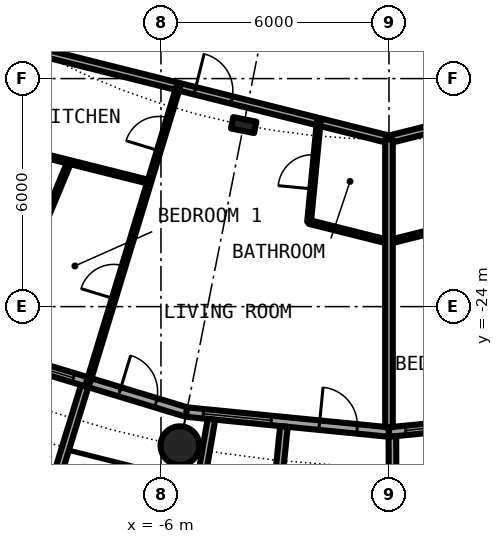
"""IFC4 building model, lengths in metres.
Left out: names, types, materials, properties, quantities, classifications, styles, units other than length and angle.
Written with IfcOpenShell. Run it as: python <this file> out.ifc"""

import sys

from ifc_helpers import new_model, si_unit, direction, frame, frame_2d, origin, origin_2d, place, context, subcontext, project, spatial, rectangle, circle, hollow_circle, i_section, extrude, element, fill, save


model = new_model("IFC4")
c1 = context("Model", 3, precision=1e-05, world=origin(), true_north=direction((0.0, 1.0)))
c2 = subcontext(c1, "Body", "Model", "MODEL_VIEW")
j1 = project(units=[si_unit("LENGTHUNIT", "METRE"), si_unit("PLANEANGLEUNIT", "RADIAN")], contexts=[c1])
p1 = place(None, origin())
s1 = spatial("IfcSite", under=j1, at=p1, CompositionType="ELEMENT")
p2 = place(p1, origin())
s2 = spatial("IfcBuilding", under=s1, at=p2, CompositionType="ELEMENT")
p3 = place(p2, frame((0.0, 0.0, 28.9)))
s3 = spatial("IfcBuildingStorey", under=s2, at=p3, CompositionType="ELEMENT", Elevation=28.9)
p4 = place(p3, frame((-5.501, -27.658, 0.0), z_axis=(0.0, 0.0, 1.0), x_axis=(1.0, 0.0, 0.0)))
e1 = element("IfcColumn", 1, at=p4, inside=s3, PredefinedType="COLUMN", context=c2, shape_type="SweptSolid", body=[
    extrude(hollow_circle(Radius=0.508, WallThickness=0.05, at=origin_2d()), origin(), (0.0, 0.0, 1.0), 3.05),
])
p5 = place(p3, frame((-3.824, -19.223, 0.0), z_axis=(0.0, 0.0, 1.0), x_axis=(-0.195090322016, -0.980785280403, 0.0)))
e2 = element("IfcColumn", 2, at=p5, inside=s3, PredefinedType="COLUMN", context=c2, shape_type="SweptSolid", body=[
    extrude(i_section(OverallWidth=0.305, OverallDepth=0.62, WebThickness=0.021, FlangeThickness=0.04, FilletRadius=0.027, at=origin_2d()), origin(), (0.0, 0.0, 1.0), 3.05),
])
p6 = place(p3, frame((-10.447, -25.222, 0.0), z_axis=(0.0, 0.0, 1.0), x_axis=(0.956965678721, -0.290201119486, 0.0)))
e3 = element("IfcWall", 3, at=p6, inside=s3, PredefinedType="SOLIDWALL", context=c2, shape_type="SweptSolid", body=[
    extrude(rectangle(XDim=5.351, YDim=0.25, at=frame_2d((2.676, 0.0))), origin(), (0.0, 0.0, 1.0), 2.7),
])
p7 = place(p6, frame((0.441, 0.0, 0.3)))
e4 = element("IfcOpeningElement", 4, at=p7, cuts=e3, PredefinedType="OPENING", context=c2, shape_type="SweptSolid", body=[
    extrude(rectangle(XDim=1.8, YDim=2.1, at=frame_2d((0.9, 1.05))), frame((0.0, 0.135, 0.0), z_axis=(0.0, -1.0, 0.0), x_axis=(1.0, 0.0, 0.0)), (0.0, 0.0, 1.0), 0.27),
])
p8 = place(p6, frame((3.51, 0.0, 0.0)))
e5 = element("IfcOpeningElement", 5, at=p8, cuts=e3, PredefinedType="OPENING", context=c2, shape_type="SweptSolid", body=[
    extrude(rectangle(XDim=1.0, YDim=2.2, at=frame_2d((0.5, 1.1))), frame((0.0, 0.135, 0.0), z_axis=(0.0, -1.0, 0.0), x_axis=(1.0, 0.0, 0.0)), (0.0, 0.0, 1.0), 0.27),
])
p9 = place(p3, frame((-11.638, -28.084, -0.03), z_axis=(0.0, 0.0, 1.0), x_axis=(0.941461077774, -0.337121697664, 0.0)))
e6 = element("IfcWall", 6, at=p9, inside=s3, PredefinedType="SOLIDWALL", context=c2, shape_type="SweptSolid", body=[
    extrude(rectangle(XDim=2.993, YDim=0.2, at=frame_2d((1.497, 0.0))), origin(), (0.0, 0.0, 1.0), 2.73),
])
p10 = place(p9, frame((0.457, 0.0, 0.33)))
e7 = element("IfcOpeningElement", 7, at=p10, cuts=e6, PredefinedType="OPENING", context=c2, shape_type="SweptSolid", body=[
    extrude(circle(Radius=1.04, at=frame_2d((1.04, 1.04))), frame((0.0, 0.11, 0.0), z_axis=(0.0, -1.0, 0.0), x_axis=(1.0, 0.0, 0.0)), (0.0, 0.0, 1.0), 0.22),
])
p11 = place(p3, frame((-8.009, -26.092, -0.03), z_axis=(0.0, 0.0, 1.0), x_axis=(-0.293406695073, -0.955987715029, 0.0)))
e8 = element("IfcWall", 8, at=p11, inside=s3, PredefinedType="SOLIDWALL", context=c2, shape_type="SweptSolid", body=[
    extrude(rectangle(XDim=3.006, YDim=0.2, at=frame_2d((1.503, 0.0))), origin(), (0.0, 0.0, 1.0), 2.73),
])
p12 = place(p3, frame((-5.326, -26.775, 0.0), z_axis=(0.0, 0.0, 1.0), x_axis=(0.995173996315, -0.098126026407, 0.0)))
e9 = element("IfcWall", 9, at=p12, inside=s3, PredefinedType="SOLIDWALL", context=c2, shape_type="SweptSolid", body=[
    extrude(rectangle(XDim=5.352, YDim=0.25, at=frame_2d((2.676, 0.0))), origin(), (0.0, 0.0, 1.0), 2.7),
])
p13 = place(p12, frame((0.441, 0.0, 0.3)))
e10 = element("IfcOpeningElement", 10, at=p13, cuts=e9, PredefinedType="OPENING", context=c2, shape_type="SweptSolid", body=[
    extrude(rectangle(XDim=1.8, YDim=2.1, at=frame_2d((0.9, 1.05))), frame((0.0, 0.135, 0.0), z_axis=(0.0, -1.0, 0.0), x_axis=(1.0, 0.0, 0.0)), (0.0, 0.0, 1.0), 0.27),
])
p14 = place(p12, frame((3.51, 0.0, 0.0)))
e11 = element("IfcOpeningElement", 11, at=p14, cuts=e9, PredefinedType="OPENING", context=c2, shape_type="SweptSolid", body=[
    extrude(rectangle(XDim=1.0, YDim=2.2, at=frame_2d((0.5, 1.1))), frame((0.0, 0.135, 0.0), z_axis=(0.0, -1.0, 0.0), x_axis=(1.0, 0.0, 0.0)), (0.0, 0.0, 1.0), 0.27),
])
p15 = place(p3, frame((-4.671, -26.966, -0.03), z_axis=(0.0, 0.0, 1.0), x_axis=(-0.170539878907, -0.985350774954, 0.0)))
e12 = element("IfcWall", 12, at=p15, inside=s3, PredefinedType="SOLIDWALL", context=c2, shape_type="SweptSolid", body=[
    extrude(rectangle(XDim=2.932, YDim=0.2, at=frame_2d((1.466, 0.0))), origin(), (0.0, 0.0, 1.0), 2.73),
])
p16 = place(p3, frame((-2.764, -27.153, -0.03), z_axis=(0.0, 0.0, 1.0), x_axis=(-0.101505487237, -0.994834979311, 0.0)))
e13 = element("IfcWall", 13, at=p16, inside=s3, PredefinedType="SOLIDWALL", context=c2, shape_type="SweptSolid", body=[
    extrude(rectangle(XDim=3.007, YDim=0.2, at=frame_2d((1.503, 0.0))), origin(), (0.0, 0.0, 1.0), 2.73),
])
p17 = place(p3, frame((0.0, -27.3, 0.0), z_axis=(0.0, 0.0, 1.0), x_axis=(0.995173996315, 0.098126026407, 0.0)))
e14 = element("IfcWall", 14, at=p17, inside=s3, PredefinedType="SOLIDWALL", context=c2, shape_type="SweptSolid", body=[
    extrude(rectangle(XDim=5.352, YDim=0.25, at=frame_2d((2.676, 0.0))), origin(), (0.0, 0.0, 1.0), 2.7),
])
p18 = place(p17, frame((0.441, 0.0, 0.3)))
e15 = element("IfcOpeningElement", 15, at=p18, cuts=e14, PredefinedType="OPENING", context=c2, shape_type="SweptSolid", body=[
    extrude(rectangle(XDim=1.8, YDim=2.1, at=frame_2d((0.9, 1.05))), frame((0.0, 0.135, 0.0), z_axis=(0.0, -1.0, 0.0), x_axis=(1.0, 0.0, 0.0)), (0.0, 0.0, 1.0), 0.27),
])
p19 = place(p17, frame((3.51, 0.0, 0.0)))
e16 = element("IfcOpeningElement", 16, at=p19, cuts=e14, PredefinedType="OPENING", context=c2, shape_type="SweptSolid", body=[
    extrude(rectangle(XDim=1.0, YDim=2.2, at=frame_2d((0.5, 1.1))), frame((0.0, 0.135, 0.0), z_axis=(0.0, -1.0, 0.0), x_axis=(1.0, 0.0, 0.0)), (0.0, 0.0, 1.0), 0.27),
])
p20 = place(p3, frame((0.09, -27.417, -0.03), z_axis=(0.0, 0.0, 1.0), x_axis=(0.00347308367, -0.999993968827, 0.0)))
e17 = element("IfcWall", 17, at=p20, inside=s3, PredefinedType="SOLIDWALL", context=c2, shape_type="SweptSolid", body=[
    extrude(rectangle(XDim=2.882, YDim=0.2, at=frame_2d((1.441, 0.0))), origin(), (0.0, 0.0, 1.0), 2.73),
])
p21 = place(p3, frame((-10.516, -19.666, 0.0), z_axis=(0.0, 0.0, 1.0), x_axis=(0.97005315629, -0.242892721118, 0.0)))
e18 = element("IfcWall", 18, at=p21, inside=s3, PredefinedType="PARTITIONING", context=c2, shape_type="SweptSolid", body=[
    extrude(rectangle(XDim=4.343, YDim=0.1, at=frame_2d((2.172, 0.0))), origin(), (0.0, 0.0, 1.0), 2.7),
])
p22 = place(p3, frame((-2.096, -21.774, 0.0), z_axis=(0.0, 0.0, 1.0), x_axis=(0.969969957613, -0.24322475476, 0.0)))
e19 = element("IfcWall", 19, at=p22, inside=s3, PredefinedType="PARTITIONING", context=c2, shape_type="SweptSolid", body=[
    extrude(rectangle(XDim=2.167, YDim=0.1, at=frame_2d((1.083, 0.0))), origin(), (0.0, 0.0, 1.0), 2.7),
])
p23 = place(p3, frame((-0.006, -22.301, 0.0), z_axis=(0.0, 0.0, 1.0), x_axis=(0.970106148391, 0.24268098577, 0.0)))
e20 = element("IfcWall", 20, at=p23, inside=s3, PredefinedType="PARTITIONING", context=c2, shape_type="SweptSolid", body=[
    extrude(rectangle(XDim=4.347, YDim=0.1, at=frame_2d((2.173, 0.0))), origin(), (0.0, 0.0, 1.0), 2.7),
])
p24 = place(p3, frame((-9.242, -17.284, 0.0), z_axis=(0.0, 0.0, 1.0), x_axis=(0.970002158938, -0.243096301198, 0.0)))
e21 = element("IfcWall", 21, at=p24, inside=s3, PredefinedType="PARTITIONING", context=c2, shape_type="SweptSolid", body=[
    extrude(rectangle(XDim=9.528, YDim=0.2, at=frame_2d((4.764, 0.0))), origin(), (0.0, 0.0, 1.0), 2.38),
])
p25 = place(p24, frame((4.262, 0.0, 0.0)))
e22 = element("IfcOpeningElement", 22, at=p25, cuts=e21, PredefinedType="OPENING", context=c2, shape_type="SweptSolid", body=[
    extrude(rectangle(XDim=1.0, YDim=2.3, at=frame_2d((0.5, 1.15))), frame((0.0, 0.11, 0.0), z_axis=(0.0, -1.0, 0.0), x_axis=(1.0, 0.0, 0.0)), (0.0, 0.0, 1.0), 0.22),
])
p26 = place(p3, frame((-0.001, -19.601, 0.0), z_axis=(0.0, 0.0, 1.0), x_axis=(0.970014215304, 0.243048188859, 0.0)))
e23 = element("IfcWall", 23, at=p26, inside=s3, PredefinedType="PARTITIONING", context=c2, shape_type="SweptSolid", body=[
    extrude(rectangle(XDim=9.526, YDim=0.2, at=frame_2d((4.763, 0.0))), origin(), (0.0, 0.0, 1.0), 2.38),
])
p27 = place(p26, frame((5.221, 0.0, 0.0)))
e24 = element("IfcOpeningElement", 24, at=p27, cuts=e23, PredefinedType="OPENING", context=c2, shape_type="SweptSolid", body=[
    extrude(rectangle(XDim=1.0, YDim=2.3, at=frame_2d((0.5, 1.15))), frame((0.0, 0.11, 0.0), z_axis=(0.0, -1.0, 0.0), x_axis=(1.0, 0.0, 0.0)), (0.0, 0.0, 1.0), 0.22),
])
p28 = place(p3, frame((-10.447, -25.086, 0.0), z_axis=(0.0, 0.0, 1.0), x_axis=(0.384363513821, 0.923181828917, 0.0)))
e25 = element("IfcWall", 25, at=p28, inside=s3, PredefinedType="PARTITIONING", context=c2, shape_type="SweptSolid", body=[
    extrude(rectangle(XDim=5.3, YDim=0.1, at=frame_2d((2.65, 0.0))), origin(), (0.0, 0.0, 1.0), 2.7),
])
p29 = place(p28, frame((2.2, 0.0, 0.0)))
e26 = element("IfcOpeningElement", 26, at=p29, cuts=e25, PredefinedType="OPENING", context=c2, shape_type="SweptSolid", body=[
    extrude(rectangle(XDim=0.9, YDim=2.3, at=frame_2d((0.45, 1.15))), frame((0.0, 0.06, 0.0), z_axis=(0.0, -1.0, 0.0), x_axis=(1.0, 0.0, 0.0)), (0.0, 0.0, 1.0), 0.12),
])
p30 = place(p3, frame((-7.914, -25.997, 0.0), z_axis=(0.0, 0.0, 1.0), x_axis=(0.291319167605, 0.956625915698, 0.0)))
e27 = element("IfcWall", 27, at=p30, inside=s3, PredefinedType="PARTITIONING", context=c2, shape_type="SweptSolid", body=[
    extrude(rectangle(XDim=8.139, YDim=0.1, at=frame_2d((4.07, 0.0))), origin(), (0.0, 0.0, 1.0), 2.7),
])
p31 = place(p30, frame((6.377, 0.0, 0.0)))
e28 = element("IfcOpeningElement", 28, at=p31, cuts=e27, PredefinedType="OPENING", context=c2, shape_type="SweptSolid", body=[
    extrude(rectangle(XDim=0.9, YDim=2.3, at=frame_2d((0.45, 1.15))), frame((0.0, 0.06, 0.0), z_axis=(0.0, -1.0, 0.0), x_axis=(1.0, 0.0, 0.0)), (0.0, 0.0, 1.0), 0.12),
])
p32 = place(p30, frame((2.308, 0.0, 0.0)))
e29 = element("IfcOpeningElement", 29, at=p32, cuts=e27, PredefinedType="OPENING", context=c2, shape_type="SweptSolid", body=[
    extrude(rectangle(XDim=0.9, YDim=2.3, at=frame_2d((0.45, 1.15))), frame((0.0, 0.06, 0.0), z_axis=(0.0, -1.0, 0.0), x_axis=(1.0, 0.0, 0.0)), (0.0, 0.0, 1.0), 0.12),
])
p33 = place(p3, frame((-2.102, -21.773, 0.0), z_axis=(0.0, 0.0, 1.0), x_axis=(0.095970632278, 0.995384165908, 0.0)))
e30 = element("IfcWall", 30, at=p33, inside=s3, PredefinedType="PARTITIONING", context=c2, shape_type="SweptSolid", body=[
    extrude(rectangle(XDim=2.648, YDim=0.1, at=frame_2d((1.324, 0.0))), origin(), (0.0, 0.0, 1.0), 2.7),
])
p34 = place(p33, frame((0.874, 0.0, 0.0)))
e31 = element("IfcOpeningElement", 31, at=p34, cuts=e30, PredefinedType="OPENING", context=c2, shape_type="SweptSolid", body=[
    extrude(rectangle(XDim=0.9, YDim=2.3, at=frame_2d((0.45, 1.15))), frame((0.0, 0.06, 0.0), z_axis=(0.0, -1.0, 0.0), x_axis=(1.0, 0.0, 0.0)), (0.0, 0.0, 1.0), 0.12),
])
p35 = place(p3, frame((0.0, -27.175, 0.0), z_axis=(0.0, 0.0, 1.0), x_axis=(0.0, 1.0, 0.0)))
e32 = element("IfcWall", 32, at=p35, inside=s3, PredefinedType="PARTITIONING", context=c2, shape_type="SweptSolid", body=[
    extrude(rectangle(XDim=7.575, YDim=0.2, at=frame_2d((3.788, 0.0))), origin(), (0.0, 0.0, 1.0), 2.7),
])
p36 = place(p7, origin())
e33 = element("IfcWindow", 33, at=p36, inside=s3, PartitioningType="SINGLE_PANEL", PredefinedType="WINDOW", context=c2, shape_type="SweptSolid", body=[
    extrude(rectangle(XDim=1.8, YDim=2.1, at=frame_2d((0.9, 1.05))), frame((0.0, 0.03, 0.0), z_axis=(0.0, -1.0, 0.0), x_axis=(1.0, 0.0, 0.0)), (0.0, 0.0, 1.0), 0.06),
])
fill(e4, e33)
p37 = place(p8, origin())
e34 = element("IfcDoor", 34, at=p37, inside=s3, OperationType="SINGLE_SWING_LEFT", PredefinedType="DOOR", context=c2, shape_type="SweptSolid", body=[
    extrude(rectangle(XDim=1.0, YDim=2.2, at=frame_2d((0.5, 1.1))), frame((0.0, 0.025, 0.0), z_axis=(0.0, -1.0, 0.0), x_axis=(1.0, 0.0, 0.0)), (0.0, 0.0, 1.0), 0.05),
])
fill(e5, e34)
p38 = place(p13, origin())
e35 = element("IfcWindow", 35, at=p38, inside=s3, PartitioningType="SINGLE_PANEL", PredefinedType="WINDOW", context=c2, shape_type="SweptSolid", body=[
    extrude(rectangle(XDim=1.8, YDim=2.1, at=frame_2d((0.9, 1.05))), frame((0.0, 0.03, 0.0), z_axis=(0.0, -1.0, 0.0), x_axis=(1.0, 0.0, 0.0)), (0.0, 0.0, 1.0), 0.06),
])
fill(e10, e35)
p39 = place(p14, origin())
e36 = element("IfcDoor", 36, at=p39, inside=s3, OperationType="SINGLE_SWING_LEFT", PredefinedType="DOOR", context=c2, shape_type="SweptSolid", body=[
    extrude(rectangle(XDim=1.0, YDim=2.2, at=frame_2d((0.5, 1.1))), frame((0.0, 0.025, 0.0), z_axis=(0.0, -1.0, 0.0), x_axis=(1.0, 0.0, 0.0)), (0.0, 0.0, 1.0), 0.05),
])
fill(e11, e36)
p40 = place(p18, origin())
e37 = element("IfcWindow", 37, at=p40, inside=s3, PartitioningType="SINGLE_PANEL", PredefinedType="WINDOW", context=c2, shape_type="SweptSolid", body=[
    extrude(rectangle(XDim=1.8, YDim=2.1, at=frame_2d((0.9, 1.05))), frame((0.0, 0.03, 0.0), z_axis=(0.0, -1.0, 0.0), x_axis=(1.0, 0.0, 0.0)), (0.0, 0.0, 1.0), 0.06),
])
fill(e15, e37)
p41 = place(p25, origin())
e38 = element("IfcDoor", 38, at=p41, inside=s3, OperationType="SINGLE_SWING_LEFT", PredefinedType="DOOR", context=c2, shape_type="SweptSolid", body=[
    extrude(rectangle(XDim=1.0, YDim=2.3, at=frame_2d((0.5, 1.15))), frame((0.0, 0.025, 0.0), z_axis=(0.0, -1.0, 0.0), x_axis=(1.0, 0.0, 0.0)), (0.0, 0.0, 1.0), 0.05),
])
fill(e22, e38)
p42 = place(p34, origin())
e39 = element("IfcDoor", 39, at=p42, inside=s3, OperationType="SINGLE_SWING_RIGHT", PredefinedType="DOOR", context=c2, shape_type="SweptSolid", body=[
    extrude(rectangle(XDim=0.9, YDim=2.3, at=frame_2d((0.45, 1.15))), frame((0.0, 0.025, 0.0), z_axis=(0.0, -1.0, 0.0), x_axis=(1.0, 0.0, 0.0)), (0.0, 0.0, 1.0), 0.05),
])
fill(e31, e39)
p43 = place(p31, origin())
e40 = element("IfcDoor", 40, at=p43, inside=s3, OperationType="SINGLE_SWING_RIGHT", PredefinedType="DOOR", context=c2, shape_type="SweptSolid", body=[
    extrude(rectangle(XDim=0.9, YDim=2.3, at=frame_2d((0.45, 1.15))), frame((0.0, 0.025, 0.0), z_axis=(0.0, -1.0, 0.0), x_axis=(1.0, 0.0, 0.0)), (0.0, 0.0, 1.0), 0.05),
])
fill(e28, e40)
p44 = place(p32, origin())
e41 = element("IfcDoor", 41, at=p44, inside=s3, OperationType="SINGLE_SWING_LEFT", PredefinedType="DOOR", context=c2, shape_type="SweptSolid", body=[
    extrude(rectangle(XDim=0.9, YDim=2.3, at=frame_2d((0.45, 1.15))), frame((0.0, 0.025, 0.0), z_axis=(0.0, -1.0, 0.0), x_axis=(1.0, 0.0, 0.0)), (0.0, 0.0, 1.0), 0.05),
])
fill(e29, e41)
save(model, sys.argv[1])
